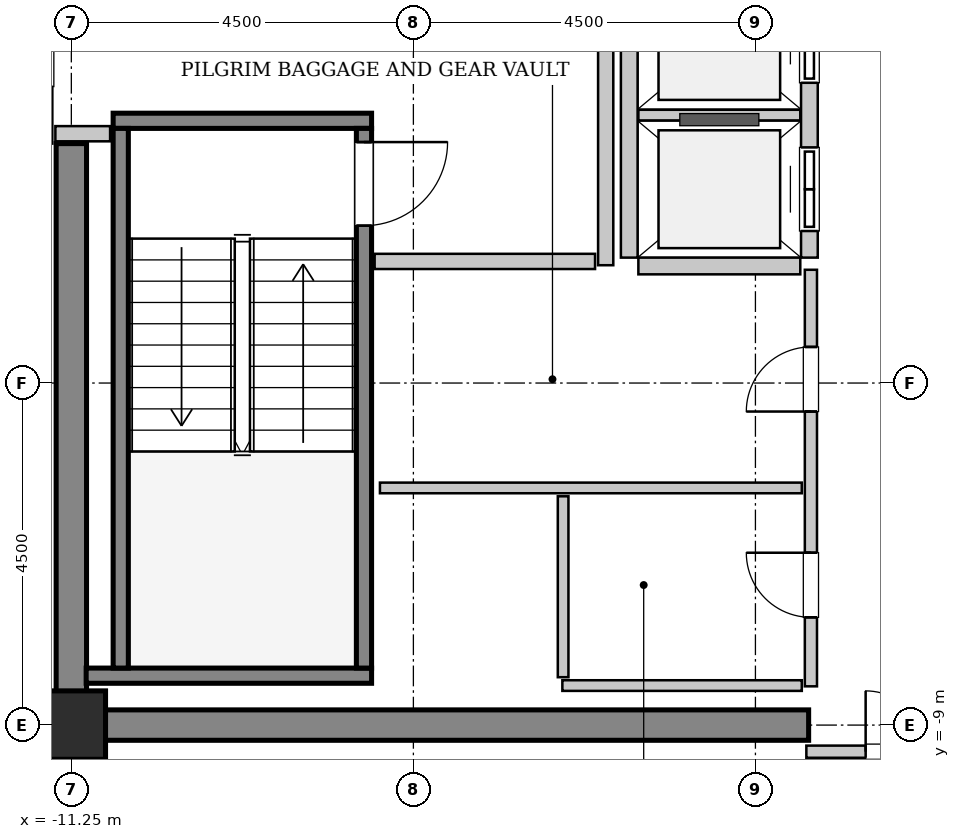
"""IFC4 building model, lengths in metres.
Left out: names, types, materials, properties, quantities, classifications, styles, units other than length and angle.
Written with IfcOpenShell. Run it as: python <this file> out.ifc"""

import sys

from ifc_helpers import new_model, si_unit, direction, frame, frame_2d, origin, origin_2d, place, context, subcontext, project, spatial, rectangle, extrude, source, transform, mapped, element, fill, save


model = new_model("IFC4")
c1 = context("Model", 3, precision=1e-05, world=origin(), true_north=direction((0.0, 1.0)))
c2 = subcontext(c1, "Body", "Model", "MODEL_VIEW")
j1 = project(units=[si_unit("LENGTHUNIT", "METRE"), si_unit("PLANEANGLEUNIT", "RADIAN")], contexts=[c1])
p1 = place(None, origin())
s1 = spatial("IfcSite", under=j1, at=p1, CompositionType="ELEMENT")
p2 = place(p1, origin())
s2 = spatial("IfcBuilding", under=s1, at=p2, CompositionType="ELEMENT")
p3 = place(p2, frame((0.0, 0.0, 322.4)))
s3 = spatial("IfcBuildingStorey", under=s2, at=p3, CompositionType="ELEMENT", Elevation=322.4)
m1 = source(origin(), c2, "Body", "SweptSolid", [
    extrude(rectangle(XDim=9.9, YDim=0.4, at=frame_2d((4.95, 0.0))), origin(), (0.0, 0.0, 1.0), 3.8),
])
p4 = place(p3, frame((-11.45, -9.0, 0.0), z_axis=(0.0, 0.0, 1.0), x_axis=(1.0, 0.0, 0.0)))
e1 = element("IfcWall", 1, at=p4, inside=s3, PredefinedType="SHEAR", context=c2, shape_type="MappedRepresentation", body=[
    mapped(m1, transform((0.0, 0.0, 0.0), x_axis=(1.0, 0.0, 0.0), y_axis=(0.0, 1.0, 0.0), z_axis=(0.0, 0.0, 1.0), scale=1.0)),
])
m2 = source(origin(), c2, "Body", "SweptSolid", [
    extrude(rectangle(XDim=7.45, YDim=0.4, at=frame_2d((3.725, 0.0))), origin(), (0.0, 0.0, 1.0), 3.8),
])
p5 = place(p3, frame((-11.25, -8.8, 0.0), z_axis=(0.0, 0.0, 1.0), x_axis=(0.0, 1.0, 0.0)))
e2 = element("IfcWall", 2, at=p5, inside=s3, PredefinedType="SHEAR", context=c2, shape_type="MappedRepresentation", body=[
    mapped(m2, transform((0.0, 0.0, 0.0), x_axis=(1.0, 0.0, 0.0), y_axis=(0.0, 1.0, 0.0), z_axis=(0.0, 0.0, 1.0), scale=1.0)),
])
m3 = source(origin(), c2, "Body", "SweptSolid", [
    extrude(rectangle(XDim=0.9, YDim=0.9, at=origin_2d()), origin(), (0.0, 0.0, 1.0), 3.8),
])
p6 = place(p3, frame((-11.25, -9.0, 0.0), z_axis=(0.0, 0.0, 1.0), x_axis=(1.0, 0.0, 0.0)))
e3 = element("IfcColumn", 3, at=p6, inside=s3, PredefinedType="COLUMN", context=c2, shape_type="MappedRepresentation", body=[
    mapped(m3, transform((0.0, 0.0, 0.0), x_axis=(1.0, 0.0, 0.0), y_axis=(0.0, 1.0, 0.0), z_axis=(0.0, 0.0, 1.0), scale=1.0)),
])
m4 = source(origin(), c2, "Body", "SweptSolid", [
    extrude(rectangle(XDim=3.4, YDim=0.2, at=frame_2d((1.7, 0.0))), origin(), (0.0, 0.0, 1.0), 3.8),
])
p7 = place(p3, frame((-10.7, -1.05, 0.0), z_axis=(0.0, 0.0, 1.0), x_axis=(1.0, 0.0, 0.0)))
e4 = element("IfcWall", 4, at=p7, inside=s3, PredefinedType="SOLIDWALL", context=c2, shape_type="MappedRepresentation", body=[
    mapped(m4, transform((0.0, 0.0, 0.0), x_axis=(1.0, 0.0, 0.0), y_axis=(0.0, 1.0, 0.0), z_axis=(0.0, 0.0, 1.0), scale=1.0)),
])
m5 = source(origin(), c2, "Body", "SweptSolid", [
    extrude(rectangle(XDim=3.755, YDim=0.2, at=frame_2d((1.877, 0.0))), origin(), (0.0, 0.0, 1.0), 3.8),
])
p8 = place(p3, frame((-11.055, -8.35, 0.0), z_axis=(0.0, 0.0, 1.0), x_axis=(1.0, 0.0, 0.0)))
e5 = element("IfcWall", 5, at=p8, inside=s3, PredefinedType="SOLIDWALL", context=c2, shape_type="MappedRepresentation", body=[
    mapped(m5, transform((0.0, 0.0, 0.0), x_axis=(1.0, 0.0, 0.0), y_axis=(0.0, 1.0, 0.0), z_axis=(0.0, 0.0, 1.0), scale=1.0)),
])
m6 = source(origin(), c2, "Body", "SweptSolid", [
    extrude(rectangle(XDim=7.1, YDim=0.2, at=frame_2d((3.55, 0.0))), origin(), (0.0, 0.0, 1.0), 3.8),
])
p9 = place(p3, frame((-10.6, -1.15, 0.0), z_axis=(0.0, 0.0, 1.0), x_axis=(0.0, -1.0, 0.0)))
e6 = element("IfcWall", 6, at=p9, inside=s3, PredefinedType="SOLIDWALL", context=c2, shape_type="MappedRepresentation", body=[
    mapped(m6, transform((0.0, 0.0, 0.0), x_axis=(1.0, 0.0, 0.0), y_axis=(0.0, 1.0, 0.0), z_axis=(0.0, 0.0, 1.0), scale=1.0)),
])
p10 = place(p3, frame((-7.4, -1.15, 0.0), z_axis=(0.0, 0.0, 1.0), x_axis=(0.0, -1.0, 0.0)))
e7 = element("IfcWall", 7, at=p10, inside=s3, PredefinedType="SOLIDWALL", context=c2, shape_type="MappedRepresentation", body=[
    mapped(m6, transform((0.0, 0.0, 0.0), x_axis=(1.0, 0.0, 0.0), y_axis=(0.0, 1.0, 0.0), z_axis=(0.0, 0.0, 1.0), scale=1.0)),
])
p11 = place(p10, frame((0.18, 0.0, 0.0)))
e8 = element("IfcOpeningElement", 8, at=p11, cuts=e7, PredefinedType="OPENING", context=c2, shape_type="SweptSolid", body=[
    extrude(rectangle(XDim=1.1, YDim=2.15, at=frame_2d((0.55, 1.075))), frame((0.0, 0.11, 0.0), z_axis=(0.0, -1.0, 0.0), x_axis=(1.0, 0.0, 0.0)), (0.0, 0.0, 1.0), 0.22),
])
m7 = source(origin(), c2, "Body", "SweptSolid", [
    extrude(rectangle(XDim=5.7, YDim=0.22, at=frame_2d((2.85, 0.0))), origin(), (0.0, 0.0, 1.0), 3.535),
])
p12 = place(p3, frame((-1.54, -2.85, 0.0), z_axis=(0.0, 0.0, 1.0), x_axis=(0.0, 1.0, 0.0)))
e9 = element("IfcWall", 9, at=p12, inside=s3, PredefinedType="SOLIDWALL", context=c2, shape_type="MappedRepresentation", body=[
    mapped(m7, transform((0.0, 0.0, 0.0), x_axis=(1.0, 0.0, 0.0), y_axis=(0.0, 1.0, 0.0), z_axis=(0.0, 0.0, 1.0), scale=1.0)),
])
p13 = place(p12, frame((0.35, 0.0, 0.0)))
e10 = element("IfcOpeningElement", 10, at=p13, cuts=e9, PredefinedType="OPENING", context=c2, shape_type="SweptSolid", body=[
    extrude(rectangle(XDim=1.1, YDim=2.2, at=frame_2d((0.55, 1.1))), frame((0.0, 0.12, 0.0), z_axis=(0.0, -1.0, 0.0), x_axis=(1.0, 0.0, 0.0)), (0.0, 0.0, 1.0), 0.24),
])
p14 = place(p12, frame((2.3, 0.0, 0.0)))
e11 = element("IfcOpeningElement", 11, at=p14, cuts=e9, PredefinedType="OPENING", context=c2, shape_type="SweptSolid", body=[
    extrude(rectangle(XDim=1.1, YDim=2.2, at=frame_2d((0.55, 1.1))), frame((0.0, 0.12, 0.0), z_axis=(0.0, -1.0, 0.0), x_axis=(1.0, 0.0, 0.0)), (0.0, 0.0, 1.0), 0.24),
])
p15 = place(p12, frame((4.25, 0.0, 0.0)))
e12 = element("IfcOpeningElement", 12, at=p15, cuts=e9, PredefinedType="OPENING", context=c2, shape_type="SweptSolid", body=[
    extrude(rectangle(XDim=1.1, YDim=2.2, at=frame_2d((0.55, 1.1))), frame((0.0, 0.12, 0.0), z_axis=(0.0, -1.0, 0.0), x_axis=(1.0, 0.0, 0.0)), (0.0, 0.0, 1.0), 0.24),
])
p16 = place(p3, frame((-3.91, 2.85, 0.0), z_axis=(0.0, 0.0, 1.0), x_axis=(0.0, -1.0, 0.0)))
e13 = element("IfcWall", 13, at=p16, inside=s3, PredefinedType="SOLIDWALL", context=c2, shape_type="MappedRepresentation", body=[
    mapped(m7, transform((0.0, 0.0, 0.0), x_axis=(1.0, 0.0, 0.0), y_axis=(0.0, 1.0, 0.0), z_axis=(0.0, 0.0, 1.0), scale=1.0)),
])
m8 = source(origin(), c2, "Body", "SweptSolid", [
    extrude(rectangle(XDim=2.13, YDim=0.22, at=frame_2d((1.065, 0.0))), origin(), (0.0, 0.0, 1.0), 3.535),
])
p17 = place(p3, frame((-3.79, -2.96, 0.0), z_axis=(0.0, 0.0, 1.0), x_axis=(1.0, 0.0, 0.0)))
e14 = element("IfcWall", 14, at=p17, inside=s3, PredefinedType="SOLIDWALL", context=c2, shape_type="MappedRepresentation", body=[
    mapped(m8, transform((0.0, 0.0, 0.0), x_axis=(1.0, 0.0, 0.0), y_axis=(0.0, 1.0, 0.0), z_axis=(0.0, 0.0, 1.0), scale=1.0)),
])
m9 = source(origin(), c2, "Body", "SweptSolid", [
    extrude(rectangle(XDim=2.13, YDim=0.14, at=frame_2d((1.065, 0.0))), origin(), (0.0, 0.0, 1.0), 3.535),
])
p18 = place(p3, frame((-3.79, -0.975, 0.0), z_axis=(0.0, 0.0, 1.0), x_axis=(1.0, 0.0, 0.0)))
e15 = element("IfcWall", 15, at=p18, inside=s3, PredefinedType="PARTITIONING", context=c2, shape_type="MappedRepresentation", body=[
    mapped(m9, transform((0.0, 0.0, 0.0), x_axis=(1.0, 0.0, 0.0), y_axis=(0.0, 1.0, 0.0), z_axis=(0.0, 0.0, 1.0), scale=1.0)),
])
m10 = source(origin(), c2, "Body", "SweptSolid", [
    extrude(rectangle(XDim=5.9, YDim=0.2, at=frame_2d((2.95, 0.0))), origin(), (0.0, 0.0, 1.0), 3.535),
])
p19 = place(p3, frame((-4.22, -2.95, 0.0), z_axis=(0.0, 0.0, 1.0), x_axis=(0.0, 1.0, 0.0)))
e16 = element("IfcWall", 16, at=p19, inside=s3, PredefinedType="PARTITIONING", context=c2, shape_type="MappedRepresentation", body=[
    mapped(m10, transform((0.0, 0.0, 0.0), x_axis=(1.0, 0.0, 0.0), y_axis=(0.0, 1.0, 0.0), z_axis=(0.0, 0.0, 1.0), scale=1.0)),
])
m11 = source(origin(), c2, "Body", "SweptSolid", [
    extrude(rectangle(XDim=2.9, YDim=0.2, at=frame_2d((1.45, 0.0))), origin(), (0.0, 0.0, 1.0), 3.535),
])
p20 = place(p3, frame((-7.26, -2.9, 0.0), z_axis=(0.0, 0.0, 1.0), x_axis=(1.0, 0.0, 0.0)))
e17 = element("IfcWall", 17, at=p20, inside=s3, PredefinedType="PARTITIONING", context=c2, shape_type="MappedRepresentation", body=[
    mapped(m11, transform((0.0, 0.0, 0.0), x_axis=(1.0, 0.0, 0.0), y_axis=(0.0, 1.0, 0.0), z_axis=(0.0, 0.0, 1.0), scale=1.0)),
])
m12 = source(origin(), c2, "Body", "SweptSolid", [
    extrude(rectangle(XDim=0.72, YDim=0.2, at=frame_2d((0.36, 0.0))), origin(), (0.0, 0.0, 1.0), 3.535),
])
p21 = place(p3, frame((-11.46, -1.22, 0.0), z_axis=(0.0, 0.0, 1.0), x_axis=(1.0, 0.0, 0.0)))
e18 = element("IfcWall", 18, at=p21, inside=s3, PredefinedType="PARTITIONING", context=c2, shape_type="MappedRepresentation", body=[
    mapped(m12, transform((0.0, 0.0, 0.0), x_axis=(1.0, 0.0, 0.0), y_axis=(0.0, 1.0, 0.0), z_axis=(0.0, 0.0, 1.0), scale=1.0)),
])
m13 = source(origin(), c2, "Body", "SweptSolid", [
    extrude(rectangle(XDim=3.16, YDim=0.16, at=frame_2d((1.58, 0.0))), origin(), (0.0, 0.0, 1.0), 2.625),
])
p22 = place(p3, frame((-1.58, -9.35, 0.0), z_axis=(0.0, 0.0, 1.0), x_axis=(1.0, 0.0, 0.0)))
e19 = element("IfcWall", 19, at=p22, inside=s3, PredefinedType="PARTITIONING", context=c2, shape_type="MappedRepresentation", body=[
    mapped(m13, transform((0.0, 0.0, 0.0), x_axis=(1.0, 0.0, 0.0), y_axis=(0.0, 1.0, 0.0), z_axis=(0.0, 0.0, 1.0), scale=1.0)),
])
p23 = place(p22, frame((0.78, 0.0, 0.0)))
e20 = element("IfcOpeningElement", 20, at=p23, cuts=e19, PredefinedType="OPENING", context=c2, shape_type="SweptSolid", body=[
    extrude(rectangle(XDim=1.6, YDim=2.3, at=frame_2d((0.8, 1.15))), frame((0.0, 0.09, 0.0), z_axis=(0.0, -1.0, 0.0), x_axis=(1.0, 0.0, 0.0)), (0.0, 0.0, 1.0), 0.18),
])
m14 = source(origin(), c2, "Body", "SweptSolid", [
    extrude(rectangle(XDim=5.48, YDim=0.16, at=frame_2d((2.74, 0.0))), origin(), (0.0, 0.0, 1.0), 3.535),
])
p24 = place(p3, frame((-1.52, -8.49, 0.0), z_axis=(0.0, 0.0, 1.0), x_axis=(0.0, 1.0, 0.0)))
e21 = element("IfcWall", 21, at=p24, inside=s3, PredefinedType="PARTITIONING", context=c2, shape_type="MappedRepresentation", body=[
    mapped(m14, transform((0.0, 0.0, 0.0), x_axis=(1.0, 0.0, 0.0), y_axis=(0.0, 1.0, 0.0), z_axis=(0.0, 0.0, 1.0), scale=1.0)),
])
p25 = place(p24, frame((0.907, 0.0, 0.0)))
e22 = element("IfcOpeningElement", 22, at=p25, cuts=e21, PredefinedType="OPENING", context=c2, shape_type="SweptSolid", body=[
    extrude(rectangle(XDim=0.85, YDim=2.1, at=frame_2d((0.425, 1.05))), frame((0.0, 0.09, 0.0), z_axis=(0.0, -1.0, 0.0), x_axis=(1.0, 0.0, 0.0)), (0.0, 0.0, 1.0), 0.18),
])
p26 = place(p24, frame((3.615, 0.0, 0.0)))
e23 = element("IfcOpeningElement", 23, at=p26, cuts=e21, PredefinedType="OPENING", context=c2, shape_type="SweptSolid", body=[
    extrude(rectangle(XDim=0.85, YDim=2.1, at=frame_2d((0.425, 1.05))), frame((0.0, 0.09, 0.0), z_axis=(0.0, -1.0, 0.0), x_axis=(1.0, 0.0, 0.0)), (0.0, 0.0, 1.0), 0.18),
])
m15 = source(origin(), c2, "Body", "SweptSolid", [
    extrude(rectangle(XDim=5.55, YDim=0.14, at=frame_2d((2.775, 0.0))), origin(), (0.0, 0.0, 1.0), 3.535),
])
p27 = place(p3, frame((-7.19, -5.88, 0.0), z_axis=(0.0, 0.0, 1.0), x_axis=(1.0, 0.0, 0.0)))
e24 = element("IfcWall", 24, at=p27, inside=s3, PredefinedType="PARTITIONING", context=c2, shape_type="MappedRepresentation", body=[
    mapped(m15, transform((0.0, 0.0, 0.0), x_axis=(1.0, 0.0, 0.0), y_axis=(0.0, 1.0, 0.0), z_axis=(0.0, 0.0, 1.0), scale=1.0)),
])
m16 = source(origin(), c2, "Body", "SweptSolid", [
    extrude(rectangle(XDim=3.15, YDim=0.14, at=frame_2d((1.575, 0.0))), origin(), (0.0, 0.0, 1.0), 3.535),
])
p28 = place(p3, frame((-4.79, -8.48, 0.0), z_axis=(0.0, 0.0, 1.0), x_axis=(1.0, 0.0, 0.0)))
e25 = element("IfcWall", 25, at=p28, inside=s3, PredefinedType="PARTITIONING", context=c2, shape_type="MappedRepresentation", body=[
    mapped(m16, transform((0.0, 0.0, 0.0), x_axis=(1.0, 0.0, 0.0), y_axis=(0.0, 1.0, 0.0), z_axis=(0.0, 0.0, 1.0), scale=1.0)),
])
m17 = source(origin(), c2, "Body", "SweptSolid", [
    extrude(rectangle(XDim=2.38, YDim=0.14, at=frame_2d((1.19, 0.0))), origin(), (0.0, 0.0, 1.0), 3.535),
])
p29 = place(p3, frame((-4.78, -8.37, 0.0), z_axis=(0.0, 0.0, 1.0), x_axis=(0.0, 1.0, 0.0)))
e26 = element("IfcWall", 26, at=p29, inside=s3, PredefinedType="PARTITIONING", context=c2, shape_type="MappedRepresentation", body=[
    mapped(m17, transform((0.0, 0.0, 0.0), x_axis=(1.0, 0.0, 0.0), y_axis=(0.0, 1.0, 0.0), z_axis=(0.0, 0.0, 1.0), scale=1.0)),
])
m18 = source(origin(), c2, "Body", "SweptSolid", [
    extrude(rectangle(XDim=1.1, YDim=2.15, at=frame_2d((0.55, 1.075))), frame((0.0, 0.025, 0.0), z_axis=(0.0, -1.0, 0.0), x_axis=(1.0, 0.0, 0.0)), (0.0, 0.0, 1.0), 0.05),
])
p30 = place(p11, origin())
e27 = element("IfcDoor", 27, at=p30, inside=s3, OperationType="SINGLE_SWING_LEFT", PredefinedType="DOOR", context=c2, shape_type="MappedRepresentation", body=[
    mapped(m18, transform((0.0, 0.0, 0.0), x_axis=(1.0, 0.0, 0.0), y_axis=(0.0, 1.0, 0.0), z_axis=(0.0, 0.0, 1.0), scale=1.0)),
])
fill(e8, e27)
m19 = source(origin(), c2, "Body", "SweptSolid", [
    extrude(rectangle(XDim=1.1, YDim=2.2, at=frame_2d((0.55, 1.1))), frame((0.0, 0.025, 0.0), z_axis=(0.0, -1.0, 0.0), x_axis=(1.0, 0.0, 0.0)), (0.0, 0.0, 1.0), 0.05),
])
p31 = place(p13, origin())
e28 = element("IfcDoor", 28, at=p31, inside=s3, OperationType="DOUBLE_DOOR_SLIDING", PredefinedType="DOOR", context=c2, shape_type="MappedRepresentation", body=[
    mapped(m19, transform((0.0, 0.0, 0.0), x_axis=(1.0, 0.0, 0.0), y_axis=(0.0, 1.0, 0.0), z_axis=(0.0, 0.0, 1.0), scale=1.0)),
])
fill(e10, e28)
p32 = place(p14, origin())
e29 = element("IfcDoor", 29, at=p32, inside=s3, OperationType="DOUBLE_DOOR_SLIDING", PredefinedType="DOOR", context=c2, shape_type="MappedRepresentation", body=[
    mapped(m19, transform((0.0, 0.0, 0.0), x_axis=(1.0, 0.0, 0.0), y_axis=(0.0, 1.0, 0.0), z_axis=(0.0, 0.0, 1.0), scale=1.0)),
])
fill(e11, e29)
m20 = source(origin(), c2, "Body", "SweptSolid", [
    extrude(rectangle(XDim=1.6, YDim=2.3, at=frame_2d((0.8, 1.15))), frame((0.0, 0.025, 0.0), z_axis=(0.0, -1.0, 0.0), x_axis=(1.0, 0.0, 0.0)), (0.0, 0.0, 1.0), 0.05),
])
p33 = place(p23, origin())
e30 = element("IfcDoor", 30, at=p33, inside=s3, OperationType="DOUBLE_DOOR_SINGLE_SWING", PredefinedType="DOOR", context=c2, shape_type="MappedRepresentation", body=[
    mapped(m20, transform((0.0, 0.0, 0.0), x_axis=(1.0, 0.0, 0.0), y_axis=(0.0, 1.0, 0.0), z_axis=(0.0, 0.0, 1.0), scale=1.0)),
])
fill(e20, e30)
m21 = source(origin(), c2, "Body", "SweptSolid", [
    extrude(rectangle(XDim=0.85, YDim=2.1, at=frame_2d((0.425, 1.05))), frame((0.0, 0.025, 0.0), z_axis=(0.0, -1.0, 0.0), x_axis=(1.0, 0.0, 0.0)), (0.0, 0.0, 1.0), 0.05),
])
p34 = place(p25, origin())
e31 = element("IfcDoor", 31, at=p34, inside=s3, OperationType="SINGLE_SWING_RIGHT", PredefinedType="DOOR", context=c2, shape_type="MappedRepresentation", body=[
    mapped(m21, transform((0.0, 0.0, 0.0), x_axis=(1.0, 0.0, 0.0), y_axis=(0.0, 1.0, 0.0), z_axis=(0.0, 0.0, 1.0), scale=1.0)),
])
fill(e22, e31)
p35 = place(p26, origin())
e32 = element("IfcDoor", 32, at=p35, inside=s3, OperationType="SINGLE_SWING_LEFT", PredefinedType="DOOR", context=c2, shape_type="MappedRepresentation", body=[
    mapped(m21, transform((0.0, 0.0, 0.0), x_axis=(1.0, 0.0, 0.0), y_axis=(0.0, 1.0, 0.0), z_axis=(0.0, 0.0, 1.0), scale=1.0)),
])
fill(e23, e32)
save(model, sys.argv[1])
